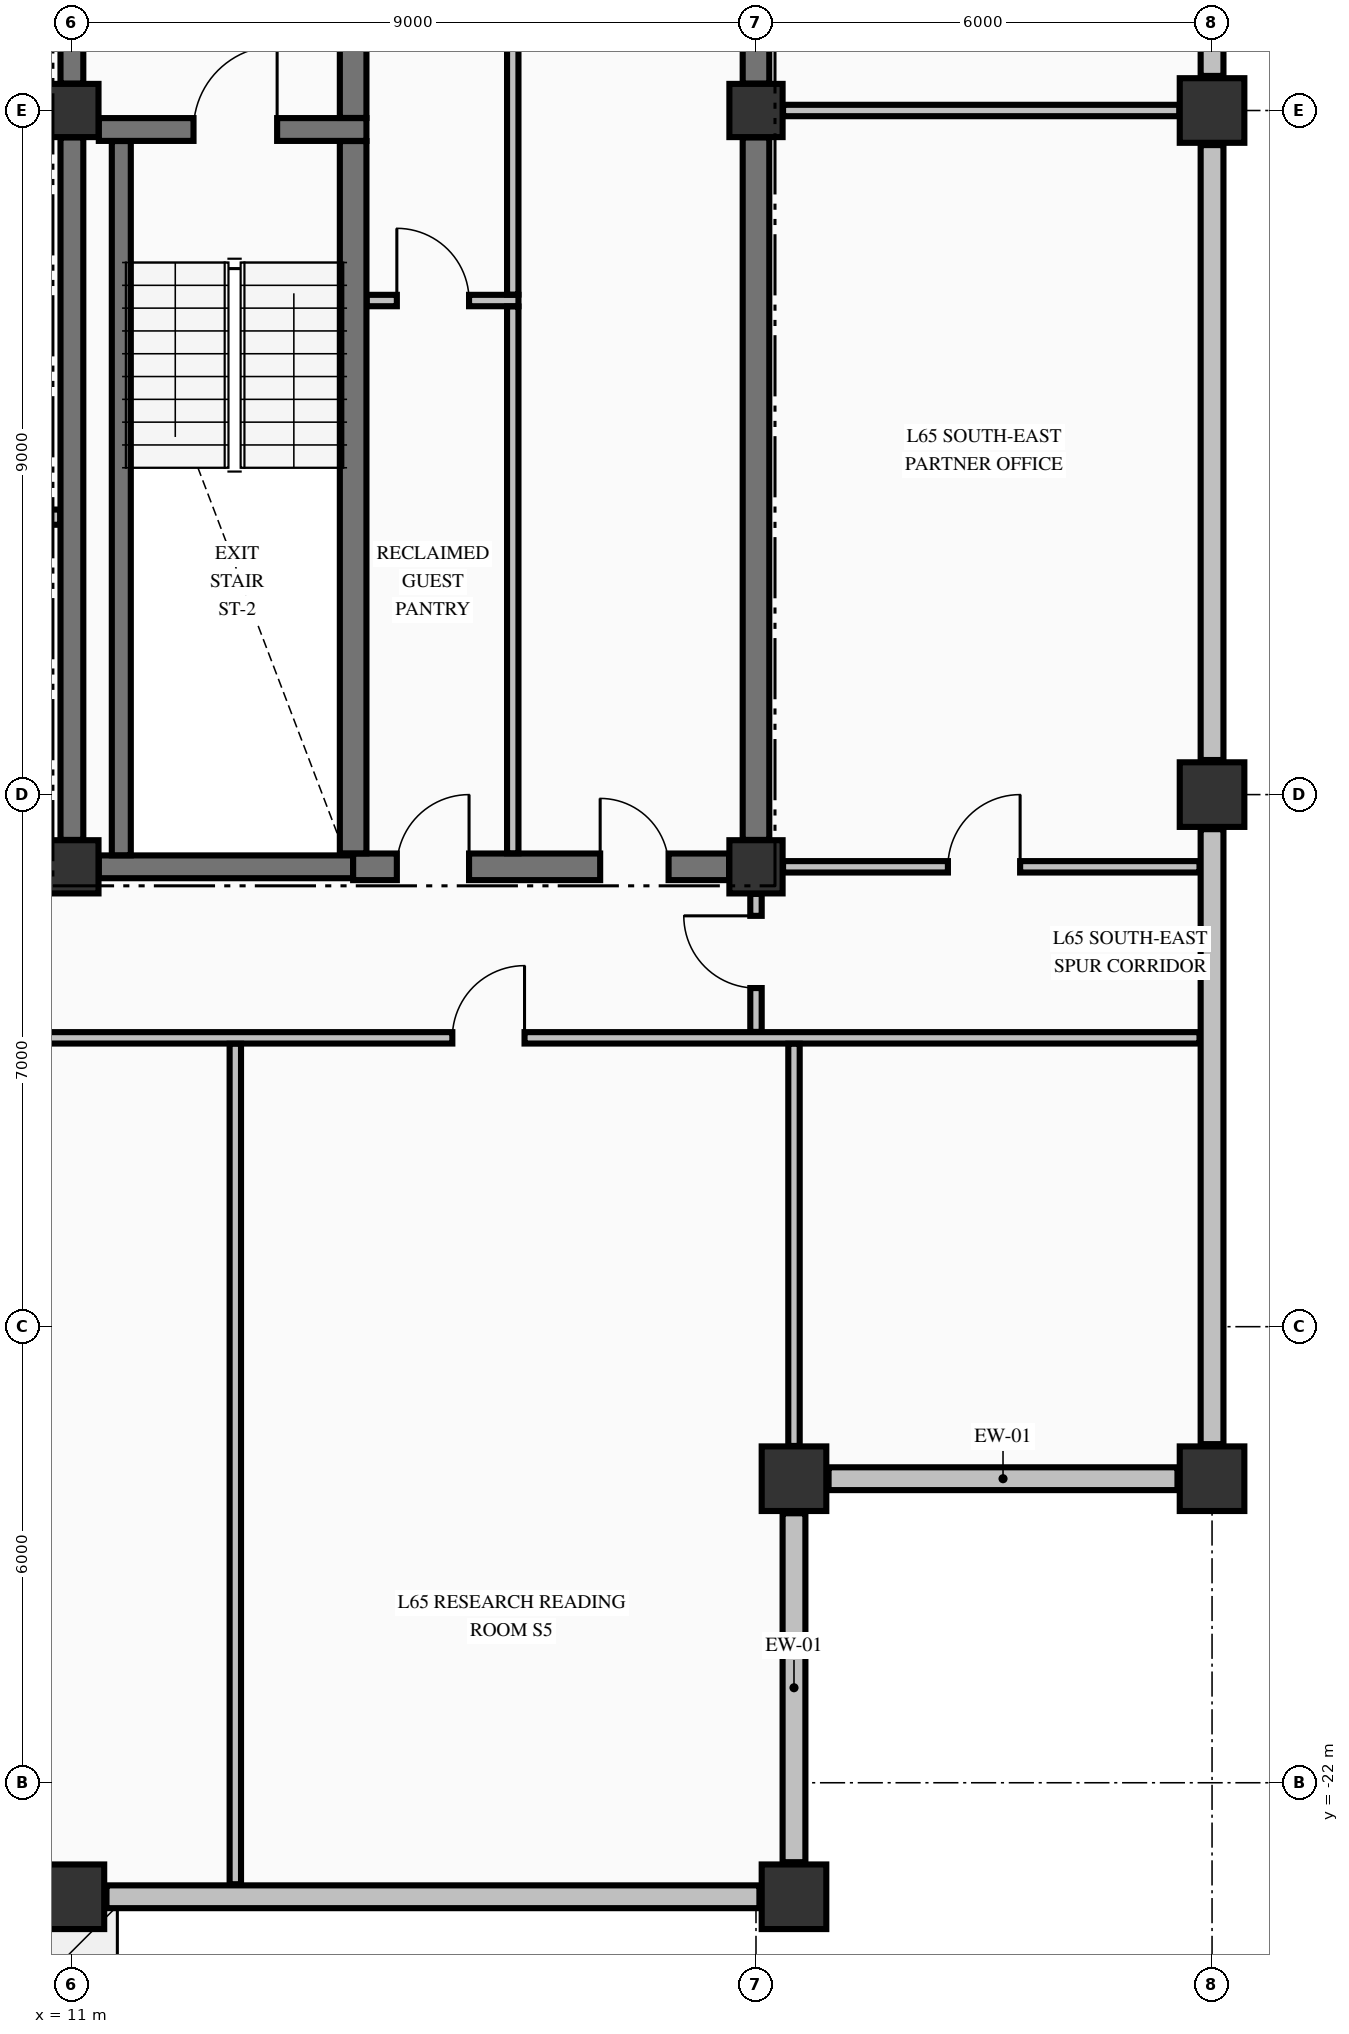
"""IFC4 building model, lengths in metres.
Left out: names, types, materials, properties, quantities, classifications, styles, units other than length and angle.
Written with IfcOpenShell. Run it as: python <this file> out.ifc"""

import sys

from ifc_helpers import new_model, si_unit, direction, frame, frame_2d, origin, origin_2d, place, context, subcontext, project, spatial, rectangle, extrude, element, fill, save


model = new_model("IFC4")
c1 = context("Model", 3, precision=1e-05, world=origin(), true_north=direction((0.0, 1.0)))
c2 = subcontext(c1, "Body", "Model", "MODEL_VIEW")
j1 = project(units=[si_unit("LENGTHUNIT", "METRE"), si_unit("PLANEANGLEUNIT", "RADIAN")], contexts=[c1])
p1 = place(None, origin())
s1 = spatial("IfcSite", under=j1, at=p1, CompositionType="ELEMENT")
p2 = place(p1, origin())
s2 = spatial("IfcBuilding", under=s1, at=p2, CompositionType="ELEMENT")
p3 = place(p2, frame((0.0, 0.0, 246.2)))
s3 = spatial("IfcBuildingStorey", under=s2, at=p3, CompositionType="ELEMENT", Elevation=246.2)
for number, where, z_axis, x_axis in (
    (1, (11.0, -23.5, -0.25), (0.0, 0.0, 1.0), (1.0, 0.0, 0.0)),
    (2, (20.5, -23.5, -0.25), (0.0, 0.0, 1.0), (1.0, 0.0, 0.0)),
    (3, (26.0, -18.0, -0.25), (0.0, 0.0, 1.0), (1.0, 0.0, 0.0)),
    (4, (26.0, -9.0, -0.25), (0.0, 0.0, 1.0), (1.0, 0.0, 0.0)),
    (5, (26.0, 0.0, -0.25), (0.0, 0.0, 1.0), (1.0, 0.0, 0.0)),
    (6, (20.5, -18.0, -0.25), (0.0, 0.0, 1.0), (1.0, 0.0, 0.0)),
):
    element("IfcColumn", number, at=place(p3, frame(where, z_axis=z_axis, x_axis=x_axis)), inside=s3, PredefinedType="COLUMN", context=c2, shape_type="SweptSolid", body=[
        extrude(rectangle(XDim=0.85, YDim=0.85, at=origin_2d()), origin(), (0.0, 0.0, 1.0), 3.055),
    ])
for number, where, z_axis, x_axis in (
    (7, (11.0, -9.95, -0.25), (0.0, 0.0, 1.0), (1.0, 0.0, 0.0)),
    (8, (11.0, 0.0, -0.25), (0.0, 0.0, 1.0), (1.0, 0.0, 0.0)),
    (9, (20.0, -9.95, -0.25), (0.0, 0.0, 1.0), (1.0, 0.0, 0.0)),
    (10, (20.0, 0.0, -0.25), (0.0, 0.0, 1.0), (1.0, 0.0, 0.0)),
):
    element("IfcColumn", number, at=place(p3, frame(where, z_axis=z_axis, x_axis=x_axis)), inside=s3, PredefinedType="COLUMN", context=c2, shape_type="SweptSolid", body=[
        extrude(rectangle(XDim=0.7, YDim=0.7, at=origin_2d()), origin(), (0.0, 0.0, 1.0), 3.055),
    ])
for number, where, z_axis, x_axis in (
    (11, (20.5, -23.045, 0.0), (0.0, 0.0, 1.0), (0.0, 1.0, 0.0)),
    (12, (20.955, -18.0, 0.0), (0.0, 0.0, 1.0), (1.0, 0.0, 0.0)),
):
    element("IfcWall", number, at=place(p3, frame(where, z_axis=z_axis, x_axis=x_axis)), inside=s3, PredefinedType="STANDARD", context=c2, shape_type="SweptSolid", body=[
        extrude(rectangle(XDim=4.59, YDim=0.3, at=frame_2d((2.295, 0.0))), origin(), (0.0, 0.0, 1.0), 2.197),
    ])
p4 = place(p3, frame((11.455, -23.5, 0.0), z_axis=(0.0, 0.0, 1.0), x_axis=(1.0, 0.0, 0.0)))
e13 = element("IfcWall", 13, at=p4, inside=s3, PredefinedType="STANDARD", context=c2, shape_type="SweptSolid", body=[
    extrude(rectangle(XDim=8.59, YDim=0.3, at=frame_2d((4.295, 0.0))), origin(), (0.0, 0.0, 1.0), 2.197),
])
for number, where, z_axis, x_axis in (
    (14, (26.0, -17.545, 0.0), (0.0, 0.0, 1.0), (0.0, 1.0, 0.0)),
    (15, (26.0, -8.545, 0.0), (0.0, 0.0, 1.0), (0.0, 1.0, 0.0)),
    (16, (26.0, 0.455, 0.0), (0.0, 0.0, 1.0), (0.0, 1.0, 0.0)),
):
    element("IfcWall", number, at=place(p3, frame(where, z_axis=z_axis, x_axis=x_axis)), inside=s3, PredefinedType="STANDARD", context=c2, shape_type="SweptSolid", body=[
        extrude(rectangle(XDim=8.09, YDim=0.3, at=frame_2d((4.045, 0.0))), origin(), (0.0, 0.0, 1.0), 2.197),
    ])
p5 = place(p3, frame((11.354, -9.95, 0.0), z_axis=(0.0, 0.0, 1.0), x_axis=(1.0, 0.0, 0.0)))
e17 = element("IfcWall", 17, at=p5, inside=s3, PredefinedType="SHEAR", context=c2, shape_type="SweptSolid", body=[
    extrude(rectangle(XDim=3.346, YDim=0.3, at=frame_2d((1.673, 0.0))), origin(), (0.0, 0.0, 1.0), 2.805),
])
p6 = place(p3, frame((14.7, -9.95, 0.0), z_axis=(0.0, 0.0, 1.0), x_axis=(1.0, 0.0, 0.0)))
e18 = element("IfcWall", 18, at=p6, inside=s3, PredefinedType="SHEAR", context=c2, shape_type="SweptSolid", body=[
    extrude(rectangle(XDim=4.946, YDim=0.35, at=frame_2d((2.473, 0.0))), origin(), (0.0, 0.0, 1.0), 2.805),
])
p7 = place(p6, frame((3.25, 0.0, 0.0)))
e19 = element("IfcOpeningElement", 19, at=p7, cuts=e18, PredefinedType="OPENING", context=c2, shape_type="SweptSolid", body=[
    extrude(rectangle(XDim=0.9, YDim=2.15, at=frame_2d((0.45, 1.075))), frame((0.0, 0.185, 0.0), z_axis=(0.0, -1.0, 0.0), x_axis=(1.0, 0.0, 0.0)), (0.0, 0.0, 1.0), 0.37),
])
p8 = place(p6, frame((0.575, 0.0, 0.0)))
e20 = element("IfcOpeningElement", 20, at=p8, cuts=e18, PredefinedType="OPENING", context=c2, shape_type="SweptSolid", body=[
    extrude(rectangle(XDim=0.95, YDim=2.15, at=frame_2d((0.475, 1.075))), frame((0.0, 0.185, 0.0), z_axis=(0.0, -1.0, 0.0), x_axis=(1.0, 0.0, 0.0)), (0.0, 0.0, 1.0), 0.37),
])
p9 = place(p3, frame((11.354, -0.25, 0.0), z_axis=(0.0, 0.0, 1.0), x_axis=(1.0, 0.0, 0.0)))
e21 = element("IfcWall", 21, at=p9, inside=s3, PredefinedType="SHEAR", context=c2, shape_type="SweptSolid", body=[
    extrude(rectangle(XDim=3.521, YDim=0.3, at=frame_2d((1.76, 0.0))), origin(), (0.0, 0.0, 1.0), 2.805),
])
p10 = place(p9, frame((1.246, 0.0, 0.0)))
e22 = element("IfcOpeningElement", 22, at=p10, cuts=e21, PredefinedType="OPENING", context=c2, shape_type="SweptSolid", body=[
    extrude(rectangle(XDim=1.1, YDim=2.15, at=frame_2d((0.55, 1.075))), frame((0.0, 0.16, 0.0), z_axis=(0.0, -1.0, 0.0), x_axis=(1.0, 0.0, 0.0)), (0.0, 0.0, 1.0), 0.32),
])
p11 = place(p3, frame((-20.075, -12.2, 0.0), z_axis=(0.0, 0.0, 1.0), x_axis=(1.0, 0.0, 0.0)))
e23 = element("IfcWall", 23, at=p11, inside=s3, PredefinedType="PARTITIONING", context=c2, shape_type="SweptSolid", body=[
    extrude(rectangle(XDim=45.91, YDim=0.15, at=frame_2d((22.955, 0.0))), origin(), (0.0, 0.0, 1.0), 2.805),
])
p12 = place(p11, frame((10.05, 0.0, 0.0)))
e24 = element("IfcOpeningElement", 24, at=p12, cuts=e23, PredefinedType="OPENING", context=c2, shape_type="SweptSolid", body=[
    extrude(rectangle(XDim=1.05, YDim=2.15, at=frame_2d((0.525, 1.075))), frame((0.0, 0.085, 0.0), z_axis=(0.0, -1.0, 0.0), x_axis=(1.0, 0.0, 0.0)), (0.0, 0.0, 1.0), 0.17),
])
p13 = place(p11, frame((14.45, 0.0, 0.0)))
e25 = element("IfcOpeningElement", 25, at=p13, cuts=e23, PredefinedType="OPENING", context=c2, shape_type="SweptSolid", body=[
    extrude(rectangle(XDim=0.95, YDim=2.15, at=frame_2d((0.475, 1.075))), frame((0.0, 0.085, 0.0), z_axis=(0.0, -1.0, 0.0), x_axis=(1.0, 0.0, 0.0)), (0.0, 0.0, 1.0), 0.17),
])
p14 = place(p11, frame((18.8, 0.0, 0.0)))
e26 = element("IfcOpeningElement", 26, at=p14, cuts=e23, PredefinedType="OPENING", context=c2, shape_type="SweptSolid", body=[
    extrude(rectangle(XDim=0.95, YDim=2.15, at=frame_2d((0.475, 1.075))), frame((0.0, 0.085, 0.0), z_axis=(0.0, -1.0, 0.0), x_axis=(1.0, 0.0, 0.0)), (0.0, 0.0, 1.0), 0.17),
])
p15 = place(p11, frame((28.1, 0.0, 0.0)))
e27 = element("IfcOpeningElement", 27, at=p15, cuts=e23, PredefinedType="OPENING", context=c2, shape_type="SweptSolid", body=[
    extrude(rectangle(XDim=1.05, YDim=2.15, at=frame_2d((0.525, 1.075))), frame((0.0, 0.085, 0.0), z_axis=(0.0, -1.0, 0.0), x_axis=(1.0, 0.0, 0.0)), (0.0, 0.0, 1.0), 0.17),
])
p16 = place(p11, frame((36.08, 0.0, 0.0)))
e28 = element("IfcOpeningElement", 28, at=p16, cuts=e23, PredefinedType="OPENING", context=c2, shape_type="SweptSolid", body=[
    extrude(rectangle(XDim=0.95, YDim=2.15, at=frame_2d((0.475, 1.075))), frame((0.0, 0.085, 0.0), z_axis=(0.0, -1.0, 0.0), x_axis=(1.0, 0.0, 0.0)), (0.0, 0.0, 1.0), 0.17),
])
p17 = place(p3, frame((20.356, -9.95, 0.0), z_axis=(0.0, 0.0, 1.0), x_axis=(1.0, 0.0, 0.0)))
e29 = element("IfcWall", 29, at=p17, inside=s3, PredefinedType="PARTITIONING", context=c2, shape_type="SweptSolid", body=[
    extrude(rectangle(XDim=5.479, YDim=0.15, at=frame_2d((2.74, 0.0))), origin(), (0.0, 0.0, 1.0), 2.805),
])
p18 = place(p17, frame((2.169, 0.0, 0.0)))
e30 = element("IfcOpeningElement", 30, at=p18, cuts=e29, PredefinedType="OPENING", context=c2, shape_type="SweptSolid", body=[
    extrude(rectangle(XDim=0.95, YDim=2.15, at=frame_2d((0.475, 1.075))), frame((0.0, 0.085, 0.0), z_axis=(0.0, -1.0, 0.0), x_axis=(1.0, 0.0, 0.0)), (0.0, 0.0, 1.0), 0.17),
])
p19 = place(p3, frame((-1.725, -5.35, 0.0), z_axis=(0.0, 0.0, 1.0), x_axis=(1.0, 0.0, 0.0)))
e31 = element("IfcWall", 31, at=p19, inside=s3, PredefinedType="PARTITIONING", context=c2, shape_type="SweptSolid", body=[
    extrude(rectangle(XDim=12.572, YDim=0.2, at=frame_2d((6.286, 0.0))), origin(), (0.0, 0.0, 1.0), 2.805),
])
p20 = place(p3, frame((14.878, -2.5, 0.0), z_axis=(0.0, 0.0, 1.0), x_axis=(1.0, 0.0, 0.0)))
e32 = element("IfcWall", 32, at=p20, inside=s3, PredefinedType="PARTITIONING", context=c2, shape_type="SweptSolid", body=[
    extrude(rectangle(XDim=1.997, YDim=0.15, at=frame_2d((0.999, 0.0))), origin(), (0.0, 0.0, 1.0), 2.805),
])
p21 = place(p20, frame((0.397, 0.0, 0.0)))
e33 = element("IfcOpeningElement", 33, at=p21, cuts=e32, PredefinedType="OPENING", context=c2, shape_type="SweptSolid", body=[
    extrude(rectangle(XDim=0.95, YDim=2.15, at=frame_2d((0.475, 1.075))), frame((0.0, 0.085, 0.0), z_axis=(0.0, -1.0, 0.0), x_axis=(1.0, 0.0, 0.0)), (0.0, 0.0, 1.0), 0.17),
])
p22 = place(p3, frame((20.356, 0.0, 0.0), z_axis=(0.0, 0.0, 1.0), x_axis=(1.0, 0.0, 0.0)))
e34 = element("IfcWall", 34, at=p22, inside=s3, PredefinedType="PARTITIONING", context=c2, shape_type="SweptSolid", body=[
    extrude(rectangle(XDim=5.213, YDim=0.15, at=frame_2d((2.606, 0.0))), origin(), (0.0, 0.0, 1.0), 2.395),
])
p23 = place(p3, frame((11.0, -9.596, 0.0), z_axis=(0.0, 0.0, 1.0), x_axis=(0.0, 1.0, 0.0)))
e35 = element("IfcWall", 35, at=p23, inside=s3, PredefinedType="SHEAR", context=c2, shape_type="SweptSolid", body=[
    extrude(rectangle(XDim=9.242, YDim=0.3, at=frame_2d((4.621, 0.0))), origin(), (0.0, 0.0, 1.0), 2.805),
])
p24 = place(p3, frame((11.0, 0.354, 0.0), z_axis=(0.0, 0.0, 1.0), x_axis=(0.0, 1.0, 0.0)))
e36 = element("IfcWall", 36, at=p24, inside=s3, PredefinedType="SHEAR", context=c2, shape_type="SweptSolid", body=[
    extrude(rectangle(XDim=2.394, YDim=0.3, at=frame_2d((1.197, 0.0))), origin(), (0.0, 0.0, 1.0), 2.805),
])
p25 = place(p24, frame((0.746, 0.0, 0.0)))
e37 = element("IfcOpeningElement", 37, at=p25, cuts=e36, PredefinedType="OPENING", context=c2, shape_type="SweptSolid", body=[
    extrude(rectangle(XDim=1.1, YDim=2.15, at=frame_2d((0.55, 1.075))), frame((0.0, 0.16, 0.0), z_axis=(0.0, -1.0, 0.0), x_axis=(1.0, 0.0, 0.0)), (0.0, 0.0, 1.0), 0.32),
])
p26 = place(p3, frame((11.65, -9.798, 0.0), z_axis=(0.0, 0.0, 1.0), x_axis=(0.0, 1.0, 0.0)))
e38 = element("IfcWall", 38, at=p26, inside=s3, PredefinedType="SOLIDWALL", context=c2, shape_type="SweptSolid", body=[
    extrude(rectangle(XDim=9.396, YDim=0.25, at=frame_2d((4.698, 0.0))), origin(), (0.0, 0.0, 1.0), 2.805),
])
p27 = place(p3, frame((14.7, -9.773, 0.0), z_axis=(0.0, 0.0, 1.0), x_axis=(0.0, 1.0, 0.0)))
e39 = element("IfcWall", 39, at=p27, inside=s3, PredefinedType="SHEAR", context=c2, shape_type="SweptSolid", body=[
    extrude(rectangle(XDim=9.371, YDim=0.35, at=frame_2d((4.686, 0.0))), origin(), (0.0, 0.0, 1.0), 2.805),
])
p28 = place(p3, frame((14.7, -0.098, 0.0), z_axis=(0.0, 0.0, 1.0), x_axis=(0.0, 1.0, 0.0)))
e40 = element("IfcWall", 40, at=p28, inside=s3, PredefinedType="SHEAR", context=c2, shape_type="SweptSolid", body=[
    extrude(rectangle(XDim=2.846, YDim=0.35, at=frame_2d((1.423, 0.0))), origin(), (0.0, 0.0, 1.0), 2.805),
])
p29 = place(p3, frame((20.0, -9.596, 0.0), z_axis=(0.0, 0.0, 1.0), x_axis=(0.0, 1.0, 0.0)))
e41 = element("IfcWall", 41, at=p29, inside=s3, PredefinedType="SHEAR", context=c2, shape_type="SweptSolid", body=[
    extrude(rectangle(XDim=9.242, YDim=0.35, at=frame_2d((4.621, 0.0))), origin(), (0.0, 0.0, 1.0), 2.805),
])
p30 = place(p3, frame((20.0, 0.354, 0.0), z_axis=(0.0, 0.0, 1.0), x_axis=(0.0, 1.0, 0.0)))
e42 = element("IfcWall", 42, at=p30, inside=s3, PredefinedType="SHEAR", context=c2, shape_type="SweptSolid", body=[
    extrude(rectangle(XDim=4.819, YDim=0.35, at=frame_2d((2.41, 0.0))), origin(), (0.0, 0.0, 1.0), 2.805),
])
p31 = place(p3, frame((13.15, -23.335, 0.0), z_axis=(0.0, 0.0, 1.0), x_axis=(0.0, 1.0, 0.0)))
e43 = element("IfcWall", 43, at=p31, inside=s3, PredefinedType="PARTITIONING", context=c2, shape_type="SweptSolid", body=[
    extrude(rectangle(XDim=11.057, YDim=0.15, at=frame_2d((5.528, 0.0))), origin(), (0.0, 0.0, 1.0), 2.805),
])
p32 = place(p3, frame((16.8, -9.772, 0.0), z_axis=(0.0, 0.0, 1.0), x_axis=(0.0, 1.0, 0.0)))
e44 = element("IfcWall", 44, at=p32, inside=s3, PredefinedType="PARTITIONING", context=c2, shape_type="SweptSolid", body=[
    extrude(rectangle(XDim=7.194, YDim=0.15, at=frame_2d((3.597, 0.0))), origin(), (0.0, 0.0, 1.0), 2.805),
])
p33 = place(p3, frame((16.8, -2.422, 0.0), z_axis=(0.0, 0.0, 1.0), x_axis=(0.0, 1.0, 0.0)))
e45 = element("IfcWall", 45, at=p33, inside=s3, PredefinedType="PARTITIONING", context=c2, shape_type="SweptSolid", body=[
    extrude(rectangle(XDim=7.144, YDim=0.15, at=frame_2d((3.572, 0.0))), origin(), (0.0, 0.0, 1.0), 2.805),
])
p34 = place(p3, frame((20.0, -12.122, 0.0), z_axis=(0.0, 0.0, 1.0), x_axis=(0.0, 1.0, 0.0)))
e46 = element("IfcWall", 46, at=p34, inside=s3, PredefinedType="PARTITIONING", context=c2, shape_type="SweptSolid", body=[
    extrude(rectangle(XDim=1.816, YDim=0.15, at=frame_2d((0.908, 0.0))), origin(), (0.0, 0.0, 1.0), 2.805),
])
p35 = place(p34, frame((0.577, 0.0, 0.0)))
e47 = element("IfcOpeningElement", 47, at=p35, cuts=e46, PredefinedType="OPENING", context=c2, shape_type="SweptSolid", body=[
    extrude(rectangle(XDim=0.95, YDim=2.15, at=frame_2d((0.475, 1.075))), frame((0.0, 0.085, 0.0), z_axis=(0.0, -1.0, 0.0), x_axis=(1.0, 0.0, 0.0)), (0.0, 0.0, 1.0), 0.17),
])
p36 = place(p3, frame((20.5, -17.569, 0.0), z_axis=(0.0, 0.0, 1.0), x_axis=(0.0, 1.0, 0.0)))
e48 = element("IfcWall", 48, at=p36, inside=s3, PredefinedType="PARTITIONING", context=c2, shape_type="SweptSolid", body=[
    extrude(rectangle(XDim=5.291, YDim=0.15, at=frame_2d((2.646, 0.0))), origin(), (0.0, 0.0, 1.0), 2.805),
])
p37 = place(p10, origin())
e49 = element("IfcDoor", 49, at=p37, inside=s3, OperationType="SINGLE_SWING_RIGHT", PredefinedType="DOOR", context=c2, shape_type="SweptSolid", body=[
    extrude(rectangle(XDim=1.1, YDim=2.15, at=frame_2d((0.55, 1.075))), frame((0.0, 0.025, 0.0), z_axis=(0.0, -1.0, 0.0), x_axis=(1.0, 0.0, 0.0)), (0.0, 0.0, 1.0), 0.05),
])
fill(e22, e49)
p38 = place(p7, origin())
e50 = element("IfcDoor", 50, at=p38, inside=s3, OperationType="SINGLE_SWING_LEFT", PredefinedType="DOOR", context=c2, shape_type="SweptSolid", body=[
    extrude(rectangle(XDim=0.9, YDim=2.15, at=frame_2d((0.45, 1.075))), frame((0.0, 0.025, 0.0), z_axis=(0.0, -1.0, 0.0), x_axis=(1.0, 0.0, 0.0)), (0.0, 0.0, 1.0), 0.05),
])
fill(e19, e50)
p39 = place(p8, origin())
e51 = element("IfcDoor", 51, at=p39, inside=s3, OperationType="SINGLE_SWING_RIGHT", PredefinedType="DOOR", context=c2, shape_type="SweptSolid", body=[
    extrude(rectangle(XDim=0.95, YDim=2.15, at=frame_2d((0.475, 1.075))), frame((0.0, 0.025, 0.0), z_axis=(0.0, -1.0, 0.0), x_axis=(1.0, 0.0, 0.0)), (0.0, 0.0, 1.0), 0.05),
])
fill(e20, e51)
p40 = place(p21, origin())
e52 = element("IfcDoor", 52, at=p40, inside=s3, OperationType="SINGLE_SWING_LEFT", PredefinedType="DOOR", context=c2, shape_type="SweptSolid", body=[
    extrude(rectangle(XDim=0.95, YDim=2.15, at=frame_2d((0.475, 1.075))), frame((0.0, 0.025, 0.0), z_axis=(0.0, -1.0, 0.0), x_axis=(1.0, 0.0, 0.0)), (0.0, 0.0, 1.0), 0.05),
])
fill(e33, e52)
p41 = place(p16, origin())
e53 = element("IfcDoor", 53, at=p41, inside=s3, OperationType="SINGLE_SWING_RIGHT", PredefinedType="DOOR", context=c2, shape_type="SweptSolid", body=[
    extrude(rectangle(XDim=0.95, YDim=2.15, at=frame_2d((0.475, 1.075))), frame((0.0, 0.025, 0.0), z_axis=(0.0, -1.0, 0.0), x_axis=(1.0, 0.0, 0.0)), (0.0, 0.0, 1.0), 0.05),
])
fill(e28, e53)
p42 = place(p35, origin())
e54 = element("IfcDoor", 54, at=p42, inside=s3, OperationType="SINGLE_SWING_RIGHT", PredefinedType="DOOR", context=c2, shape_type="SweptSolid", body=[
    extrude(rectangle(XDim=0.95, YDim=2.15, at=frame_2d((0.475, 1.075))), frame((0.0, 0.025, 0.0), z_axis=(0.0, -1.0, 0.0), x_axis=(1.0, 0.0, 0.0)), (0.0, 0.0, 1.0), 0.05),
])
fill(e47, e54)
p43 = place(p18, origin())
e55 = element("IfcDoor", 55, at=p43, inside=s3, OperationType="SINGLE_SWING_RIGHT", PredefinedType="DOOR", context=c2, shape_type="SweptSolid", body=[
    extrude(rectangle(XDim=0.95, YDim=2.15, at=frame_2d((0.475, 1.075))), frame((0.0, 0.025, 0.0), z_axis=(0.0, -1.0, 0.0), x_axis=(1.0, 0.0, 0.0)), (0.0, 0.0, 1.0), 0.05),
])
fill(e30, e55)
save(model, sys.argv[1])
